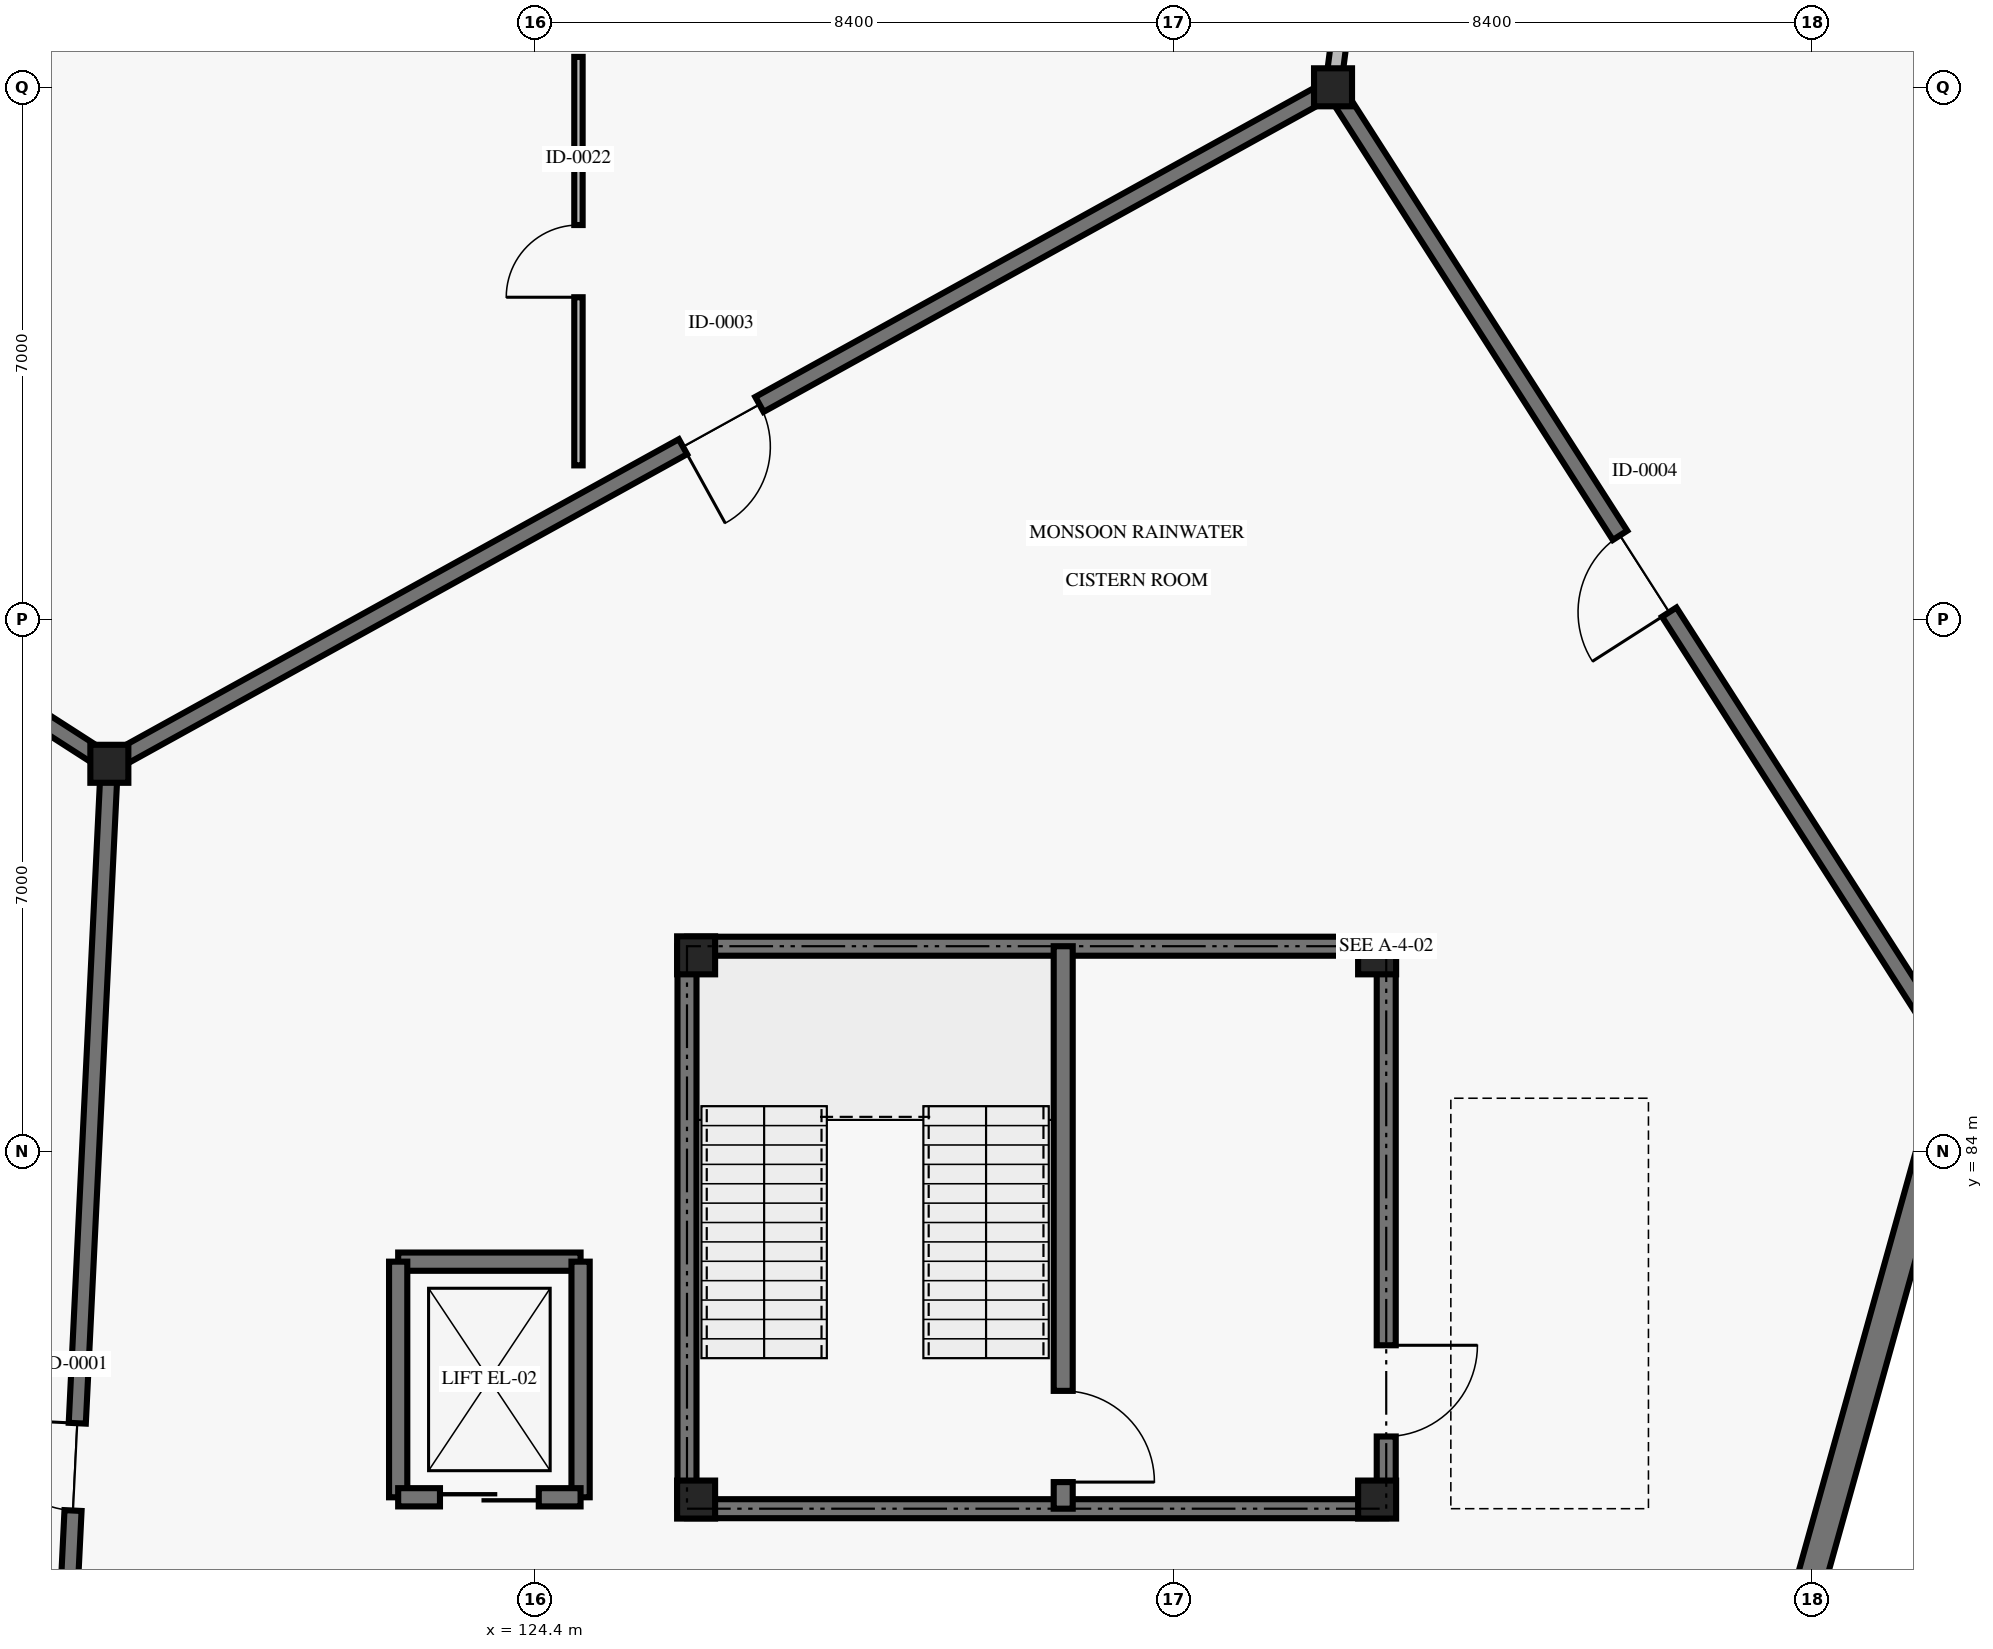
"""IFC4 building model, lengths in metres.
Left out: names, types, materials, properties, quantities, classifications, styles, units other than length and angle.
Written with IfcOpenShell. Run it as: python <this file> out.ifc"""

import sys

from ifc_helpers import new_model, si_unit, direction, frame, frame_2d, origin, origin_2d, place, context, subcontext, project, spatial, rectangle, i_section, extrude, element, fill, save


model = new_model("IFC4")
c1 = context("Model", 3, precision=1e-05, world=origin(), true_north=direction((0.0, 1.0)))
c2 = subcontext(c1, "Body", "Model", "MODEL_VIEW")
j1 = project(units=[si_unit("LENGTHUNIT", "METRE"), si_unit("PLANEANGLEUNIT", "RADIAN")], contexts=[c1])
p1 = place(None, origin())
s1 = spatial("IfcSite", under=j1, at=p1, CompositionType="ELEMENT")
p2 = place(p1, origin())
s2 = spatial("IfcBuilding", under=s1, at=p2, CompositionType="ELEMENT")
p3 = place(p2, frame((0.0, 0.0, -4.5)))
s3 = spatial("IfcBuildingStorey", under=s2, at=p3, CompositionType="ELEMENT", Elevation=-4.5)
for number, where, z_axis, x_axis in (
    (1, (118.8, 89.1, 0.0), (0.0, 0.0, 1.0), (1.0, 0.0, 0.0)),
    (2, (134.9, 98.0, 0.0), (0.0, 0.0, 1.0), (1.0, 0.0, 0.0)),
    (3, (126.52, 79.42, 0.0), (0.0, 0.0, 1.0), (1.0, 0.0, 0.0)),
    (4, (135.48, 79.42, 0.0), (0.0, 0.0, 1.0), (1.0, 0.0, 0.0)),
    (5, (135.48, 86.58, 0.0), (0.0, 0.0, 1.0), (1.0, 0.0, 0.0)),
    (6, (126.52, 86.58, 0.0), (0.0, 0.0, 1.0), (1.0, 0.0, 0.0)),
):
    element("IfcColumn", number, at=place(p3, frame(where, z_axis=z_axis, x_axis=x_axis)), inside=s3, PredefinedType="COLUMN", context=c2, shape_type="SweptSolid", body=[
        extrude(i_section(OverallWidth=0.5, OverallDepth=0.5, WebThickness=0.022, FlangeThickness=0.036, at=origin_2d()), origin(), (0.0, 0.0, 1.0), 4.5),
    ])
p4 = place(p3, frame((139.5, 72.3, 0.0), z_axis=(0.0, 0.0, 1.0), x_axis=(0.268819495644, 0.963190572401, 0.0)))
e7 = element("IfcWall", 7, at=p4, inside=s3, PredefinedType="USERDEFINED", context=c2, shape_type="SweptSolid", body=[
    extrude(rectangle(XDim=13.343, YDim=0.38, at=frame_2d((6.672, 0.0))), origin(), (0.0, 0.0, 1.0), 4.14),
])
p5 = place(p3, frame((117.9, 70.6, 0.0), z_axis=(0.0, 0.0, 1.0), x_axis=(0.048599072515, 0.998818366947, 0.0)))
e8 = element("IfcWall", 8, at=p5, inside=s3, PredefinedType="SOLIDWALL", context=c2, shape_type="SweptSolid", body=[
    extrude(rectangle(XDim=18.522, YDim=0.225, at=frame_2d((9.261, 0.0))), origin(), (0.0, 0.0, 1.0), 4.14),
])
p6 = place(p5, frame((8.686, 0.0, 0.0)))
e9 = element("IfcOpeningElement", 9, at=p6, cuts=e8, PredefinedType="OPENING", context=c2, shape_type="SweptSolid", body=[
    extrude(rectangle(XDim=1.15, YDim=2.2, at=frame_2d((0.575, 1.1))), frame((0.0, 0.123, 0.0), z_axis=(0.0, -1.0, 0.0), x_axis=(1.0, 0.0, 0.0)), (0.0, 0.0, 1.0), 0.245),
])
p7 = place(p3, frame((118.8, 89.1, 0.0), z_axis=(0.0, 0.0, 1.0), x_axis=(-0.841183241423, 0.540750177392, 0.0)))
e10 = element("IfcWall", 10, at=p7, inside=s3, PredefinedType="SOLIDWALL", context=c2, shape_type="SweptSolid", body=[
    extrude(rectangle(XDim=18.308, YDim=0.225, at=frame_2d((9.154, 0.0))), origin(), (0.0, 0.0, 1.0), 4.14),
])
p8 = place(p7, frame((8.554, 0.0, 0.0)))
e11 = element("IfcOpeningElement", 11, at=p8, cuts=e10, PredefinedType="OPENING", context=c2, shape_type="SweptSolid", body=[
    extrude(rectangle(XDim=1.2, YDim=2.2, at=frame_2d((0.6, 1.1))), frame((0.0, 0.123, 0.0), z_axis=(0.0, -1.0, 0.0), x_axis=(1.0, 0.0, 0.0)), (0.0, 0.0, 1.0), 0.245),
])
p9 = place(p3, frame((134.9, 98.0, 0.0), z_axis=(0.0, 0.0, 1.0), x_axis=(-0.875181353329, -0.483794996652, 0.0)))
e12 = element("IfcWall", 12, at=p9, inside=s3, PredefinedType="SOLIDWALL", context=c2, shape_type="SweptSolid", body=[
    extrude(rectangle(XDim=18.396, YDim=0.225, at=frame_2d((9.198, 0.0))), origin(), (0.0, 0.0, 1.0), 4.14),
])
p10 = place(p9, frame((8.623, 0.0, 0.0)))
e13 = element("IfcOpeningElement", 13, at=p10, cuts=e12, PredefinedType="OPENING", context=c2, shape_type="SweptSolid", body=[
    extrude(rectangle(XDim=1.15, YDim=2.2, at=frame_2d((0.575, 1.1))), frame((0.0, 0.123, 0.0), z_axis=(0.0, -1.0, 0.0), x_axis=(1.0, 0.0, 0.0)), (0.0, 0.0, 1.0), 0.245),
])
p11 = place(p3, frame((143.1, 85.2, 0.0), z_axis=(0.0, 0.0, 1.0), x_axis=(-0.539434641352, 0.842027474439, 0.0)))
e14 = element("IfcWall", 14, at=p11, inside=s3, PredefinedType="SOLIDWALL", context=c2, shape_type="SweptSolid", body=[
    extrude(rectangle(XDim=15.201, YDim=0.225, at=frame_2d((7.601, 0.0))), origin(), (0.0, 0.0, 1.0), 4.14),
])
p12 = place(p11, frame((7.001, 0.0, 0.0)))
e15 = element("IfcOpeningElement", 15, at=p12, cuts=e14, PredefinedType="OPENING", context=c2, shape_type="SweptSolid", body=[
    extrude(rectangle(XDim=1.2, YDim=2.2, at=frame_2d((0.6, 1.1))), frame((0.0, 0.123, 0.0), z_axis=(0.0, -1.0, 0.0), x_axis=(1.0, 0.0, 0.0)), (0.0, 0.0, 1.0), 0.245),
])
p13 = place(p3, frame((134.9, 98.0, 0.0), z_axis=(0.0, 0.0, 1.0), x_axis=(0.127980011854, 0.991776747341, 0.0)))
e16 = element("IfcWall", 16, at=p13, inside=s3, PredefinedType="SOLIDWALL", context=c2, shape_type="SweptSolid", body=[
    extrude(rectangle(XDim=6.251, YDim=0.205, at=frame_2d((3.126, 0.0))), origin(), (0.0, 0.0, 1.0), 3.02),
])
p14 = place(p13, frame((2.551, 0.0, 0.0)))
e17 = element("IfcOpeningElement", 17, at=p14, cuts=e16, PredefinedType="OPENING", context=c2, shape_type="SweptSolid", body=[
    extrude(rectangle(XDim=1.15, YDim=2.2, at=frame_2d((0.575, 1.1))), frame((0.0, 0.113, 0.0), z_axis=(0.0, -1.0, 0.0), x_axis=(1.0, 0.0, 0.0)), (0.0, 0.0, 1.0), 0.225),
])
p15 = place(p3, frame((124.972, 93.026, 0.0), z_axis=(0.0, 0.0, 1.0), x_axis=(0.0, 1.0, 0.0)))
e18 = element("IfcWall", 18, at=p15, inside=s3, PredefinedType="PARTITIONING", context=c2, shape_type="SweptSolid", body=[
    extrude(rectangle(XDim=5.374, YDim=0.11, at=frame_2d((2.687, 0.0))), origin(), (0.0, 0.0, 1.0), 3.02),
])
p16 = place(p15, frame((2.212, 0.0, 0.0)))
e19 = element("IfcOpeningElement", 19, at=p16, cuts=e18, PredefinedType="OPENING", context=c2, shape_type="SweptSolid", body=[
    extrude(rectangle(XDim=0.95, YDim=2.15, at=frame_2d((0.475, 1.075))), frame((0.0, 0.065, 0.0), z_axis=(0.0, -1.0, 0.0), x_axis=(1.0, 0.0, 0.0)), (0.0, 0.0, 1.0), 0.13),
])
p17 = place(p3, frame((126.4, 79.3, 0.0), z_axis=(0.0, 0.0, 1.0), x_axis=(0.0, 1.0, 0.0)))
e20 = element("IfcWall", 20, at=p17, inside=s3, PredefinedType="SHEAR", context=c2, shape_type="SweptSolid", body=[
    extrude(rectangle(XDim=7.4, YDim=0.25, at=frame_2d((3.7, 0.0))), origin(), (0.0, 0.0, 1.0), 4.14),
])
for number, where, z_axis, x_axis in (
    (21, (126.4, 86.7, 0.0), (0.0, 0.0, 1.0), (1.0, 0.0, 0.0)),
    (22, (135.6, 79.3, 0.0), (0.0, 0.0, 1.0), (-1.0, 0.0, 0.0)),
):
    element("IfcWall", number, at=place(p3, frame(where, z_axis=z_axis, x_axis=x_axis)), inside=s3, PredefinedType="SHEAR", context=c2, shape_type="SweptSolid", body=[
        extrude(rectangle(XDim=9.2, YDim=0.25, at=frame_2d((4.6, 0.0))), origin(), (0.0, 0.0, 1.0), 4.14),
    ])
p18 = place(p3, frame((135.6, 86.7, 0.0), z_axis=(0.0, 0.0, 1.0), x_axis=(0.0, -1.0, 0.0)))
e23 = element("IfcWall", 23, at=p18, inside=s3, PredefinedType="SHEAR", context=c2, shape_type="SweptSolid", body=[
    extrude(rectangle(XDim=7.4, YDim=0.25, at=frame_2d((3.7, 0.0))), origin(), (0.0, 0.0, 1.0), 4.14),
])
p19 = place(p18, frame((5.25, 0.0, 0.0)))
e24 = element("IfcOpeningElement", 24, at=p19, cuts=e23, PredefinedType="OPENING", context=c2, shape_type="SweptSolid", body=[
    extrude(rectangle(XDim=1.2, YDim=2.2, at=frame_2d((0.6, 1.1))), frame((0.0, 0.135, 0.0), z_axis=(0.0, -1.0, 0.0), x_axis=(1.0, 0.0, 0.0)), (0.0, 0.0, 1.0), 0.27),
])
p20 = place(p3, frame((131.35, 86.7, 0.0), z_axis=(0.0, 0.0, 1.0), x_axis=(0.0, -1.0, 0.0)))
e25 = element("IfcWall", 25, at=p20, inside=s3, PredefinedType="SHEAR", context=c2, shape_type="SweptSolid", body=[
    extrude(rectangle(XDim=7.4, YDim=0.25, at=frame_2d((3.7, 0.0))), origin(), (0.0, 0.0, 1.0), 4.14),
])
p21 = place(p20, frame((5.85, 0.0, 0.0)))
e26 = element("IfcOpeningElement", 26, at=p21, cuts=e25, PredefinedType="OPENING", context=c2, shape_type="SweptSolid", body=[
    extrude(rectangle(XDim=1.2, YDim=2.2, at=frame_2d((0.6, 1.1))), frame((0.0, 0.135, 0.0), z_axis=(0.0, -1.0, 0.0), x_axis=(1.0, 0.0, 0.0)), (0.0, 0.0, 1.0), 0.27),
])
p22 = place(p3, frame((122.6, 82.55, 0.0), z_axis=(0.0, 0.0, 1.0), x_axis=(1.0, 0.0, 0.0)))
e27 = element("IfcWall", 27, at=p22, inside=s3, PredefinedType="SHEAR", context=c2, shape_type="SweptSolid", body=[
    extrude(rectangle(XDim=2.4, YDim=0.24, at=frame_2d((1.2, 0.0))), origin(), (0.0, 0.0, 1.0), 4.26),
])
for number, where, z_axis, x_axis in (
    (28, (125.0, 82.55, 0.0), (0.0, 0.0, 1.0), (0.0, -1.0, 0.0)),
    (29, (122.6, 79.45, 0.0), (0.0, 0.0, 1.0), (0.0, 1.0, 0.0)),
):
    element("IfcWall", number, at=place(p3, frame(where, z_axis=z_axis, x_axis=x_axis)), inside=s3, PredefinedType="SHEAR", context=c2, shape_type="SweptSolid", body=[
        extrude(rectangle(XDim=3.1, YDim=0.24, at=frame_2d((1.55, 0.0))), origin(), (0.0, 0.0, 1.0), 4.26),
    ])
p23 = place(p3, frame((125.0, 79.45, 0.0), z_axis=(0.0, 0.0, 1.0), x_axis=(-1.0, 0.0, 0.0)))
e30 = element("IfcWall", 30, at=p23, inside=s3, PredefinedType="SHEAR", context=c2, shape_type="SweptSolid", body=[
    extrude(rectangle(XDim=2.4, YDim=0.24, at=frame_2d((1.2, 0.0))), origin(), (0.0, 0.0, 1.0), 4.26),
])
p24 = place(p23, frame((0.55, 0.0, 0.0)))
e31 = element("IfcOpeningElement", 31, at=p24, cuts=e30, PredefinedType="OPENING", context=c2, shape_type="SweptSolid", body=[
    extrude(rectangle(XDim=1.3, YDim=2.25, at=frame_2d((0.65, 1.125))), frame((0.0, 0.13, 0.0), z_axis=(0.0, -1.0, 0.0), x_axis=(1.0, 0.0, 0.0)), (0.0, 0.0, 1.0), 0.26),
])
p25 = place(p6, origin())
e32 = element("IfcDoor", 32, at=p25, inside=s3, OperationType="SINGLE_SWING_RIGHT", PredefinedType="DOOR", context=c2, shape_type="SweptSolid", body=[
    extrude(rectangle(XDim=1.15, YDim=2.2, at=frame_2d((0.575, 1.1))), frame((0.0, 0.025, 0.0), z_axis=(0.0, -1.0, 0.0), x_axis=(1.0, 0.0, 0.0)), (0.0, 0.0, 1.0), 0.05),
])
fill(e9, e32)
p26 = place(p10, origin())
e33 = element("IfcDoor", 33, at=p26, inside=s3, OperationType="SINGLE_SWING_RIGHT", PredefinedType="DOOR", context=c2, shape_type="SweptSolid", body=[
    extrude(rectangle(XDim=1.15, YDim=2.2, at=frame_2d((0.575, 1.1))), frame((0.0, 0.025, 0.0), z_axis=(0.0, -1.0, 0.0), x_axis=(1.0, 0.0, 0.0)), (0.0, 0.0, 1.0), 0.05),
])
fill(e13, e33)
p27 = place(p12, origin())
e34 = element("IfcDoor", 34, at=p27, inside=s3, OperationType="SINGLE_SWING_LEFT", PredefinedType="DOOR", context=c2, shape_type="SweptSolid", body=[
    extrude(rectangle(XDim=1.2, YDim=2.2, at=frame_2d((0.6, 1.1))), frame((0.0, 0.025, 0.0), z_axis=(0.0, -1.0, 0.0), x_axis=(1.0, 0.0, 0.0)), (0.0, 0.0, 1.0), 0.05),
])
fill(e15, e34)
p28 = place(p16, origin())
e35 = element("IfcDoor", 35, at=p28, inside=s3, OperationType="SINGLE_SWING_LEFT", PredefinedType="DOOR", context=c2, shape_type="SweptSolid", body=[
    extrude(rectangle(XDim=0.95, YDim=2.15, at=frame_2d((0.475, 1.075))), frame((0.0, 0.025, 0.0), z_axis=(0.0, -1.0, 0.0), x_axis=(1.0, 0.0, 0.0)), (0.0, 0.0, 1.0), 0.05),
])
fill(e19, e35)
p29 = place(p19, origin())
e36 = element("IfcDoor", 36, at=p29, inside=s3, OperationType="SINGLE_SWING_LEFT", PredefinedType="DOOR", context=c2, shape_type="SweptSolid", body=[
    extrude(rectangle(XDim=1.2, YDim=2.2, at=frame_2d((0.6, 1.1))), frame((0.0, 0.025, 0.0), z_axis=(0.0, -1.0, 0.0), x_axis=(1.0, 0.0, 0.0)), (0.0, 0.0, 1.0), 0.05),
])
fill(e24, e36)
p30 = place(p21, origin())
e37 = element("IfcDoor", 37, at=p30, inside=s3, OperationType="SINGLE_SWING_RIGHT", PredefinedType="DOOR", context=c2, shape_type="SweptSolid", body=[
    extrude(rectangle(XDim=1.2, YDim=2.2, at=frame_2d((0.6, 1.1))), frame((0.0, 0.025, 0.0), z_axis=(0.0, -1.0, 0.0), x_axis=(1.0, 0.0, 0.0)), (0.0, 0.0, 1.0), 0.05),
])
fill(e26, e37)
p31 = place(p24, origin())
e38 = element("IfcDoor", 38, at=p31, inside=s3, OperationType="SLIDING_TO_LEFT", PredefinedType="DOOR", context=c2, shape_type="SweptSolid", body=[
    extrude(rectangle(XDim=1.3, YDim=2.25, at=frame_2d((0.65, 1.125))), frame((0.0, 0.025, 0.0), z_axis=(0.0, -1.0, 0.0), x_axis=(1.0, 0.0, 0.0)), (0.0, 0.0, 1.0), 0.05),
])
fill(e31, e38)
save(model, sys.argv[1])
